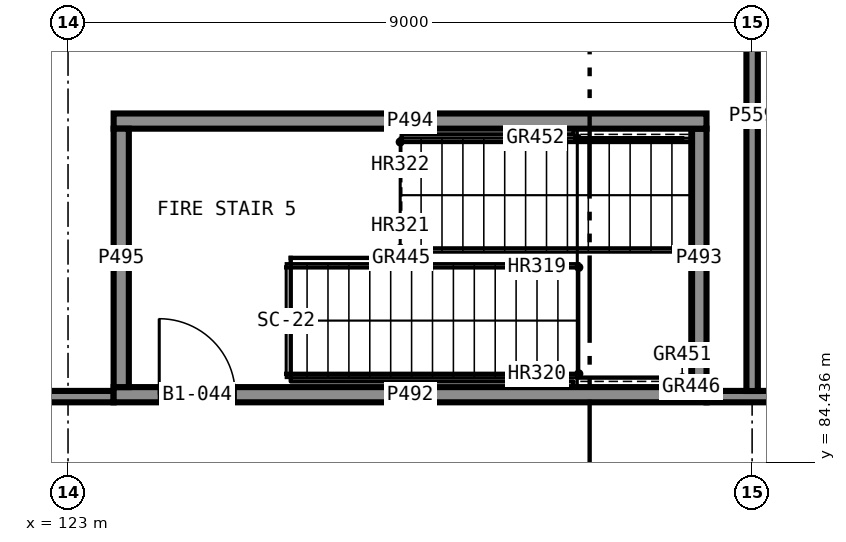
"""IFC4 building model, lengths in metres.
Left out: names, types, materials, properties, quantities, classifications, styles, units other than length and angle.
Written with IfcOpenShell. Run it as: python <this file> out.ifc"""

import sys

from ifc_helpers import new_model, si_unit, direction, frame, frame_2d, origin, place, context, subcontext, project, spatial, rectangle, extrude, element, fill, save


model = new_model("IFC4")
c1 = context("Model", 3, precision=1e-05, world=origin(), true_north=direction((0.0, 1.0)))
c2 = subcontext(c1, "Body", "Model", "MODEL_VIEW")
j1 = project(units=[si_unit("LENGTHUNIT", "METRE"), si_unit("PLANEANGLEUNIT", "RADIAN")], contexts=[c1])
p1 = place(None, origin())
s1 = spatial("IfcSite", under=j1, at=p1, CompositionType="ELEMENT")
p2 = place(p1, origin())
s2 = spatial("IfcBuilding", under=s1, at=p2, CompositionType="ELEMENT")
p3 = place(p2, frame((0.0, 0.0, -5.0)))
s3 = spatial("IfcBuildingStorey", under=s2, at=p3, CompositionType="ELEMENT", Elevation=-5.0)
p4 = place(p3, frame((123.6, 85.325, 0.0), z_axis=(0.0, 0.0, 1.0), x_axis=(1.0, 0.0, 0.0)))
e1 = element("IfcWall", 1, at=p4, inside=s3, PredefinedType="SHEAR", context=c2, shape_type="SweptSolid", body=[
    extrude(rectangle(XDim=7.8, YDim=0.2, at=frame_2d((3.9, 0.0))), origin(), (0.0, 0.0, 1.0), 4.58),
])
p5 = place(p4, frame((0.6, 0.0, 0.0)))
e2 = element("IfcOpeningElement", 2, at=p5, cuts=e1, PredefinedType="OPENING", context=c2, shape_type="SweptSolid", body=[
    extrude(rectangle(XDim=1.0, YDim=2.1, at=frame_2d((0.5, 1.05))), frame((0.0, 0.11, 0.0), z_axis=(0.0, -1.0, 0.0), x_axis=(1.0, 0.0, 0.0)), (0.0, 0.0, 1.0), 0.22),
])
p6 = place(p3, frame((131.3, 85.425, 0.0), z_axis=(0.0, 0.0, 1.0), x_axis=(0.0, 1.0, 0.0)))
e3 = element("IfcWall", 3, at=p6, inside=s3, PredefinedType="SHEAR", context=c2, shape_type="SweptSolid", body=[
    extrude(rectangle(XDim=3.4, YDim=0.2, at=frame_2d((1.7, 0.0))), origin(), (0.0, 0.0, 1.0), 4.58),
])
p7 = place(p3, frame((131.4, 88.925, 0.0), z_axis=(0.0, 0.0, 1.0), x_axis=(-1.0, 0.0, 0.0)))
e4 = element("IfcWall", 4, at=p7, inside=s3, PredefinedType="SHEAR", context=c2, shape_type="SweptSolid", body=[
    extrude(rectangle(XDim=7.8, YDim=0.2, at=frame_2d((3.9, 0.0))), origin(), (0.0, 0.0, 1.0), 4.58),
])
p8 = place(p3, frame((123.7, 88.825, 0.0), z_axis=(0.0, 0.0, 1.0), x_axis=(0.0, -1.0, 0.0)))
e5 = element("IfcWall", 5, at=p8, inside=s3, PredefinedType="SHEAR", context=c2, shape_type="SweptSolid", body=[
    extrude(rectangle(XDim=3.4, YDim=0.2, at=frame_2d((1.7, 0.0))), origin(), (0.0, 0.0, 1.0), 4.58),
])
p9 = place(p3, frame((120.775, 85.3, 0.0), z_axis=(0.0, 0.0, 1.0), x_axis=(1.0, 0.0, 0.0)))
e6 = element("IfcWall", 6, at=p9, inside=s3, PredefinedType="PARTITIONING", context=c2, shape_type="SweptSolid", body=[
    extrude(rectangle(XDim=2.825, YDim=0.15, at=frame_2d((1.413, 0.0))), origin(), (0.0, 0.0, 1.0), 4.58),
])
p10 = place(p3, frame((131.4, 85.3, 0.0), z_axis=(0.0, 0.0, 1.0), x_axis=(1.0, 0.0, 0.0)))
e7 = element("IfcWall", 7, at=p10, inside=s3, PredefinedType="PARTITIONING", context=c2, shape_type="SweptSolid", body=[
    extrude(rectangle(XDim=11.825, YDim=0.15, at=frame_2d((5.913, 0.0))), origin(), (0.0, 0.0, 1.0), 4.58),
])
p11 = place(p3, frame((132.0, 85.374, 0.0), z_axis=(0.0, 0.0, 1.0), x_axis=(0.0, 1.0, 0.0)))
e8 = element("IfcWall", 8, at=p11, inside=s3, PredefinedType="PARTITIONING", context=c2, shape_type="SweptSolid", body=[
    extrude(rectangle(XDim=7.227, YDim=0.15, at=frame_2d((3.614, 0.0))), origin(), (0.0, 0.0, 1.0), 3.68),
])
p12 = place(p5, origin())
e9 = element("IfcDoor", 9, at=p12, inside=s3, OperationType="SINGLE_SWING_RIGHT", PredefinedType="DOOR", context=c2, shape_type="SweptSolid", body=[
    extrude(rectangle(XDim=1.0, YDim=2.1, at=frame_2d((0.5, 1.05))), frame((0.0, 0.025, 0.0), z_axis=(0.0, -1.0, 0.0), x_axis=(1.0, 0.0, 0.0)), (0.0, 0.0, 1.0), 0.05),
])
fill(e2, e9)
save(model, sys.argv[1])
